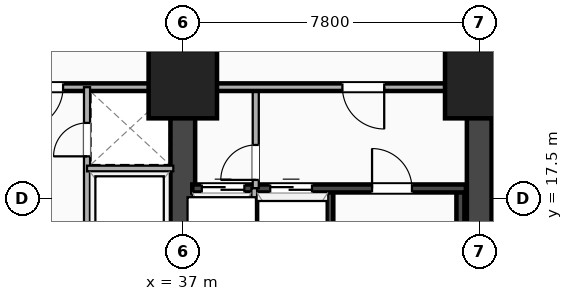
"""IFC4 building model, lengths in metres.
Left out: names, types, materials, properties, quantities, classifications, styles, units other than length and angle.
Written with IfcOpenShell. Run it as: python <this file> out.ifc"""

import sys

from ifc_helpers import new_model, si_unit, direction, frame, frame_2d, origin, origin_2d, place, context, subcontext, project, spatial, rectangle, extrude, element, fill, save


model = new_model("IFC4")
c1 = context("Model", 3, precision=1e-05, world=origin(), true_north=direction((0.0, 1.0)))
c2 = subcontext(c1, "Body", "Model", "MODEL_VIEW")
j1 = project(units=[si_unit("LENGTHUNIT", "METRE"), si_unit("PLANEANGLEUNIT", "RADIAN")], contexts=[c1])
p1 = place(None, origin())
s1 = spatial("IfcSite", under=j1, at=p1, CompositionType="ELEMENT")
p2 = place(p1, origin())
s2 = spatial("IfcBuilding", under=s1, at=p2, CompositionType="ELEMENT")
p3 = place(p2, frame((0.0, 0.0, 5.4)))
s3 = spatial("IfcBuildingStorey", under=s2, at=p3, CompositionType="ELEMENT", Elevation=5.4)
p4 = place(p3, frame((44.8, 3.5, 0.0), z_axis=(0.0, 0.0, 1.0), x_axis=(0.0, 1.0, 0.0)))
e1 = element("IfcWall", 1, at=p4, inside=s3, PredefinedType="SHEAR", context=c2, shape_type="SweptSolid", body=[
    extrude(rectangle(XDim=16.9, YDim=0.65, at=frame_2d((8.45, 0.0))), origin(), (0.0, 0.0, 1.0), 4.3),
])
p5 = place(p3, frame((37.0, 3.5, 0.0), z_axis=(0.0, 0.0, 1.0), x_axis=(0.0, 1.0, 0.0)))
e2 = element("IfcWall", 2, at=p5, inside=s3, PredefinedType="SHEAR", context=c2, shape_type="SweptSolid", body=[
    extrude(rectangle(XDim=16.9, YDim=0.65, at=frame_2d((8.45, 0.0))), origin(), (0.0, 0.0, 1.0), 4.3),
])
p6 = place(p5, frame((6.65, 0.0, 0.0)))
e3 = element("IfcOpeningElement", 3, at=p6, cuts=e2, PredefinedType="OPENING", context=c2, shape_type="SweptSolid", body=[
    extrude(rectangle(XDim=1.1, YDim=2.15, at=frame_2d((0.55, 1.075))), frame((0.0, 0.335, 0.0), z_axis=(0.0, -1.0, 0.0), x_axis=(1.0, 0.0, 0.0)), (0.0, 0.0, 1.0), 0.67),
])
for number, where, z_axis, x_axis in (
    (4, (40.855, 9.745, 0.0), (0.0, 0.0, 1.0), (0.0, 1.0, 0.0)),
    (5, (44.305, 9.745, 0.0), (0.0, 0.0, 1.0), (0.0, 1.0, 0.0)),
):
    element("IfcWall", number, at=place(p3, frame(where, z_axis=z_axis, x_axis=x_axis)), inside=s3, PredefinedType="SHEAR", context=c2, shape_type="SweptSolid", body=[
        extrude(rectangle(XDim=8.01, YDim=0.21, at=frame_2d((4.005, 0.0))), origin(), (0.0, 0.0, 1.0), 4.3),
    ])
p7 = place(p3, frame((37.25, 17.755, 0.0), z_axis=(0.0, 0.0, 1.0), x_axis=(1.0, 0.0, 0.0)))
e6 = element("IfcWall", 6, at=p7, inside=s3, PredefinedType="SHEAR", context=c2, shape_type="SweptSolid", body=[
    extrude(rectangle(XDim=7.2, YDim=0.21, at=frame_2d((3.6, 0.0))), origin(), (0.0, 0.0, 1.0), 4.3),
])
p8 = place(p7, frame((0.25, 0.0, 0.0)))
e7 = element("IfcOpeningElement", 7, at=p8, cuts=e6, PredefinedType="OPENING", context=c2, shape_type="SweptSolid", body=[
    extrude(rectangle(XDim=1.12, YDim=2.2, at=frame_2d((0.56, 1.1))), frame((0.0, 0.115, 0.0), z_axis=(0.0, -1.0, 0.0), x_axis=(1.0, 0.0, 0.0)), (0.0, 0.0, 1.0), 0.23),
])
p9 = place(p7, frame((2.05, 0.0, 0.0)))
e8 = element("IfcOpeningElement", 8, at=p9, cuts=e6, PredefinedType="OPENING", context=c2, shape_type="SweptSolid", body=[
    extrude(rectangle(XDim=1.1, YDim=2.18, at=frame_2d((0.55, 1.09))), frame((0.0, 0.115, 0.0), z_axis=(0.0, -1.0, 0.0), x_axis=(1.0, 0.0, 0.0)), (0.0, 0.0, 1.0), 0.23),
])
p10 = place(p7, frame((5.78, 0.0, 0.0), z_axis=(0.0, 0.0, 1.0), x_axis=(-1.0, 0.0, 0.0)))
e9 = element("IfcOpeningElement", 9, at=p10, cuts=e6, PredefinedType="OPENING", context=c2, shape_type="SweptSolid", body=[
    extrude(rectangle(XDim=1.05, YDim=2.15, at=frame_2d((0.525, 1.075))), frame((0.0, 0.115, 0.0), z_axis=(0.0, -1.0, 0.0), x_axis=(1.0, 0.0, 0.0)), (0.0, 0.0, 1.0), 0.23),
])
for number, where, z_axis, x_axis in (
    (10, (37.0, 20.5, -0.3), (0.0, 0.0, 1.0), (1.0, 0.0, 0.0)),
    (11, (44.8, 20.5, -0.3), (0.0, 0.0, 1.0), (1.0, 0.0, 0.0)),
):
    element("IfcColumn", number, at=place(p3, frame(where, z_axis=z_axis, x_axis=x_axis)), inside=s3, PredefinedType="COLUMN", context=c2, shape_type="SweptSolid", body=[
        extrude(rectangle(XDim=1.8, YDim=1.8, at=origin_2d()), origin(), (0.0, 0.0, 1.0), 4.6),
    ])
p11 = place(p3, frame((38.92, 17.76, 0.0), z_axis=(0.0, 0.0, 1.0), x_axis=(0.0, 1.0, 0.0)))
e12 = element("IfcWall", 12, at=p11, inside=s3, PredefinedType="PARTITIONING", context=c2, shape_type="SweptSolid", body=[
    extrude(rectangle(XDim=2.66, YDim=0.16, at=frame_2d((1.33, 0.0))), origin(), (0.0, 0.0, 1.0), 3.373),
])
p12 = place(p11, frame((1.14, 0.0, 0.0), z_axis=(0.0, 0.0, 1.0), x_axis=(-1.0, 0.0, 0.0)))
e13 = element("IfcOpeningElement", 13, at=p12, cuts=e12, PredefinedType="OPENING", context=c2, shape_type="SweptSolid", body=[
    extrude(rectangle(XDim=0.92, YDim=2.08, at=frame_2d((0.46, 1.04))), frame((0.0, 0.09, 0.0), z_axis=(0.0, -1.0, 0.0), x_axis=(1.0, 0.0, 0.0)), (0.0, 0.0, 1.0), 0.18),
])
p13 = place(p3, frame((38.88, 14.72, 0.0), z_axis=(0.0, 0.0, 1.0), x_axis=(0.0, 1.0, 0.0)))
e14 = element("IfcWall", 14, at=p13, inside=s3, PredefinedType="PARTITIONING", context=c2, shape_type="SweptSolid", body=[
    extrude(rectangle(XDim=3.04, YDim=0.15, at=frame_2d((1.52, 0.0))), origin(), (0.0, 0.0, 1.0), 4.3),
])
p14 = place(p3, frame((29.2, 20.42, 0.0), z_axis=(0.0, 0.0, 1.0), x_axis=(1.0, 0.0, 0.0)))
e15 = element("IfcWall", 15, at=p14, inside=s3, PredefinedType="PARTITIONING", context=c2, shape_type="SweptSolid", body=[
    extrude(rectangle(XDim=7.8, YDim=0.2, at=frame_2d((3.9, 0.0))), origin(), (0.0, 0.0, 1.0), 2.635),
])
p15 = place(p14, frame((3.55, 0.0, 0.0)))
e16 = element("IfcOpeningElement", 16, at=p15, cuts=e15, PredefinedType="OPENING", context=c2, shape_type="SweptSolid", body=[
    extrude(rectangle(XDim=1.1, YDim=2.15, at=frame_2d((0.55, 1.075))), frame((0.0, 0.11, 0.0), z_axis=(0.0, -1.0, 0.0), x_axis=(1.0, 0.0, 0.0)), (0.0, 0.0, 1.0), 0.22),
])
p16 = place(p3, frame((37.0, 20.42, 0.0), z_axis=(0.0, 0.0, 1.0), x_axis=(1.0, 0.0, 0.0)))
e17 = element("IfcWall", 17, at=p16, inside=s3, PredefinedType="PARTITIONING", context=c2, shape_type="SweptSolid", body=[
    extrude(rectangle(XDim=7.45, YDim=0.2, at=frame_2d((3.725, 0.0))), origin(), (0.0, 0.0, 1.0), 3.373),
])
p17 = place(p16, frame((4.2, 0.0, 0.0)))
e18 = element("IfcOpeningElement", 18, at=p17, cuts=e17, PredefinedType="OPENING", context=c2, shape_type="SweptSolid", body=[
    extrude(rectangle(XDim=1.1, YDim=2.15, at=frame_2d((0.55, 1.075))), frame((0.0, 0.11, 0.0), z_axis=(0.0, -1.0, 0.0), x_axis=(1.0, 0.0, 0.0)), (0.0, 0.0, 1.0), 0.22),
])
p18 = place(p3, frame((34.48, 12.5, 0.0), z_axis=(0.0, 0.0, 1.0), x_axis=(0.0, 1.0, 0.0)))
e19 = element("IfcWall", 19, at=p18, inside=s3, PredefinedType="PARTITIONING", context=c2, shape_type="SweptSolid", body=[
    extrude(rectangle(XDim=7.92, YDim=0.16, at=frame_2d((3.96, 0.0))), origin(), (0.0, 0.0, 1.0), 3.373),
])
p19 = place(p18, frame((6.98, 0.0, 0.0), z_axis=(0.0, 0.0, 1.0), x_axis=(-1.0, 0.0, 0.0)))
e20 = element("IfcOpeningElement", 20, at=p19, cuts=e19, PredefinedType="OPENING", context=c2, shape_type="SweptSolid", body=[
    extrude(rectangle(XDim=0.88, YDim=2.08, at=frame_2d((0.44, 1.04))), frame((0.0, 0.09, 0.0), z_axis=(0.0, -1.0, 0.0), x_axis=(1.0, 0.0, 0.0)), (0.0, 0.0, 1.0), 0.18),
])
p20 = place(p3, frame((34.48, 18.28, 0.0), z_axis=(0.0, 0.0, 1.0), x_axis=(1.0, 0.0, 0.0)))
e21 = element("IfcWall", 21, at=p20, inside=s3, PredefinedType="PARTITIONING", context=c2, shape_type="SweptSolid", body=[
    extrude(rectangle(XDim=2.27, YDim=0.15, at=frame_2d((1.135, 0.0))), origin(), (0.0, 0.0, 1.0), 3.43),
])
p21 = place(p3, frame((44.8, 20.42, 0.0), z_axis=(0.0, 0.0, 1.0), x_axis=(1.0, 0.0, 0.0)))
e22 = element("IfcWall", 22, at=p21, inside=s3, PredefinedType="PARTITIONING", context=c2, shape_type="SweptSolid", body=[
    extrude(rectangle(XDim=5.12, YDim=0.2, at=frame_2d((2.56, 0.0))), origin(), (0.0, 0.0, 1.0), 3.373),
])
p22 = place(p21, frame((4.781, 0.0, 0.0), z_axis=(0.0, 0.0, 1.0), x_axis=(-1.0, 0.0, 0.0)))
e23 = element("IfcOpeningElement", 23, at=p22, cuts=e22, PredefinedType="OPENING", context=c2, shape_type="SweptSolid", body=[
    extrude(rectangle(XDim=1.1, YDim=2.15, at=frame_2d((0.55, 1.075))), frame((0.0, 0.11, 0.0), z_axis=(0.0, -1.0, 0.0), x_axis=(1.0, 0.0, 0.0)), (0.0, 0.0, 1.0), 0.22),
])
p23 = place(p8, origin())
e24 = element("IfcDoor", 24, at=p23, inside=s3, OperationType="DOUBLE_DOOR_SLIDING", PredefinedType="DOOR", context=c2, shape_type="SweptSolid", body=[
    extrude(rectangle(XDim=1.12, YDim=2.2, at=frame_2d((0.56, 1.1))), frame((0.0, 0.025, 0.0), z_axis=(0.0, -1.0, 0.0), x_axis=(1.0, 0.0, 0.0)), (0.0, 0.0, 1.0), 0.05),
])
fill(e7, e24)
p24 = place(p9, origin())
e25 = element("IfcDoor", 25, at=p24, inside=s3, OperationType="DOUBLE_DOOR_SLIDING", PredefinedType="DOOR", context=c2, shape_type="SweptSolid", body=[
    extrude(rectangle(XDim=1.1, YDim=2.18, at=frame_2d((0.55, 1.09))), frame((0.0, 0.025, 0.0), z_axis=(0.0, -1.0, 0.0), x_axis=(1.0, 0.0, 0.0)), (0.0, 0.0, 1.0), 0.05),
])
fill(e8, e25)
p25 = place(p10, origin())
e26 = element("IfcDoor", 26, at=p25, inside=s3, OperationType="SINGLE_SWING_LEFT", PredefinedType="DOOR", context=c2, shape_type="SweptSolid", body=[
    extrude(rectangle(XDim=1.05, YDim=2.15, at=frame_2d((0.525, 1.075))), frame((0.0, 0.025, 0.0), z_axis=(0.0, -1.0, 0.0), x_axis=(1.0, 0.0, 0.0)), (0.0, 0.0, 1.0), 0.05),
])
fill(e9, e26)
p26 = place(p12, origin())
e27 = element("IfcDoor", 27, at=p26, inside=s3, OperationType="SINGLE_SWING_LEFT", PredefinedType="DOOR", context=c2, shape_type="SweptSolid", body=[
    extrude(rectangle(XDim=0.92, YDim=2.08, at=frame_2d((0.46, 1.04))), frame((0.0, 0.025, 0.0), z_axis=(0.0, -1.0, 0.0), x_axis=(1.0, 0.0, 0.0)), (0.0, 0.0, 1.0), 0.05),
])
fill(e13, e27)
p27 = place(p15, origin())
e28 = element("IfcDoor", 28, at=p27, inside=s3, OperationType="SINGLE_SWING_LEFT", PredefinedType="DOOR", context=c2, shape_type="SweptSolid", body=[
    extrude(rectangle(XDim=1.1, YDim=2.15, at=frame_2d((0.55, 1.075))), frame((0.0, 0.025, 0.0), z_axis=(0.0, -1.0, 0.0), x_axis=(1.0, 0.0, 0.0)), (0.0, 0.0, 1.0), 0.05),
])
fill(e16, e28)
p28 = place(p17, origin())
e29 = element("IfcDoor", 29, at=p28, inside=s3, OperationType="SINGLE_SWING_RIGHT", PredefinedType="DOOR", context=c2, shape_type="SweptSolid", body=[
    extrude(rectangle(XDim=1.1, YDim=2.15, at=frame_2d((0.55, 1.075))), frame((0.0, 0.025, 0.0), z_axis=(0.0, -1.0, 0.0), x_axis=(1.0, 0.0, 0.0)), (0.0, 0.0, 1.0), 0.05),
])
fill(e18, e29)
p29 = place(p19, origin())
e30 = element("IfcDoor", 30, at=p29, inside=s3, OperationType="SINGLE_SWING_LEFT", PredefinedType="DOOR", context=c2, shape_type="SweptSolid", body=[
    extrude(rectangle(XDim=0.88, YDim=2.08, at=frame_2d((0.44, 1.04))), frame((0.0, 0.025, 0.0), z_axis=(0.0, -1.0, 0.0), x_axis=(1.0, 0.0, 0.0)), (0.0, 0.0, 1.0), 0.05),
])
fill(e20, e30)
save(model, sys.argv[1])
